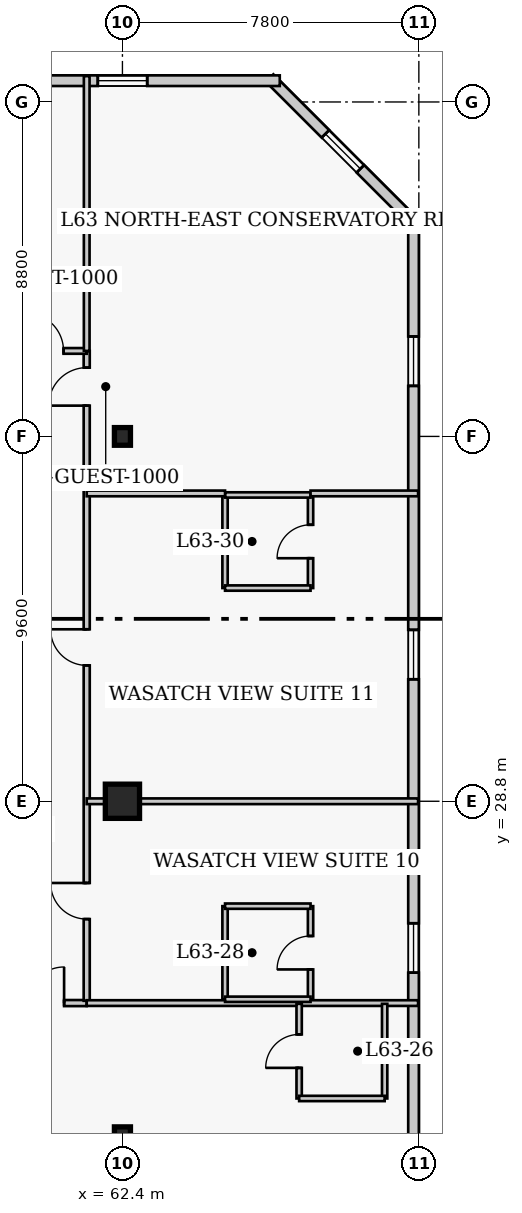
"""IFC4 building model, lengths in metres.
Left out: names, types, materials, properties, quantities, classifications, styles, units other than length and angle.
Written with IfcOpenShell. Run it as: python <this file> out.ifc"""

import sys

from ifc_helpers import new_model, si_unit, direction, frame, frame_2d, origin, origin_2d, place, context, subcontext, project, spatial, rectangle, i_section, extrude, element, fill, save


model = new_model("IFC4")
c1 = context("Model", 3, precision=1e-05, world=origin(), true_north=direction((0.0, 1.0)))
c2 = subcontext(c1, "Body", "Model", "MODEL_VIEW")
j1 = project(units=[si_unit("LENGTHUNIT", "METRE"), si_unit("PLANEANGLEUNIT", "RADIAN")], contexts=[c1])
p1 = place(None, origin())
s1 = spatial("IfcSite", under=j1, at=p1, CompositionType="ELEMENT")
p2 = place(p1, origin())
s2 = spatial("IfcBuilding", under=s1, at=p2, CompositionType="ELEMENT")
p3 = place(p2, frame((0.0, 0.0, 253.4)))
s3 = spatial("IfcBuildingStorey", under=s2, at=p3, CompositionType="ELEMENT", Elevation=253.4)
p4 = place(p3, frame((62.4, 20.0, 0.0), z_axis=(0.0, 0.0, 1.0), x_axis=(1.0, 0.0, 0.0)))
e1 = element("IfcColumn", 1, at=p4, inside=s3, PredefinedType="COLUMN", context=c2, shape_type="SweptSolid", body=[
    extrude(i_section(OverallWidth=0.422, OverallDepth=0.465, WebThickness=0.045, FlangeThickness=0.073, FilletRadius=0.017, at=origin_2d()), origin(), (0.0, 0.0, 1.0), 4.0),
])
p5 = place(p3, frame((62.4, 28.8, 0.0), z_axis=(0.0, 0.0, 1.0), x_axis=(1.0, 0.0, 0.0)))
e2 = element("IfcColumn", 2, at=p5, inside=s3, PredefinedType="COLUMN", context=c2, shape_type="SweptSolid", body=[
    extrude(rectangle(XDim=0.9, YDim=0.9, at=origin_2d()), origin(), (0.0, 0.0, 1.0), 4.0),
])
p6 = place(p3, frame((62.4, 38.4, 0.0), z_axis=(0.0, 0.0, 1.0), x_axis=(1.0, 0.0, 0.0)))
e3 = element("IfcColumn", 3, at=p6, inside=s3, PredefinedType="COLUMN", context=c2, shape_type="SweptSolid", body=[
    extrude(i_section(OverallWidth=0.422, OverallDepth=0.465, WebThickness=0.045, FlangeThickness=0.073, FilletRadius=0.017, at=origin_2d()), origin(), (0.0, 0.0, 1.0), 4.0),
])
p7 = place(p3, frame((70.06, 13.36, 0.0), z_axis=(0.0, 0.0, 1.0), x_axis=(0.0, 1.0, 0.0)))
e4 = element("IfcWall", 4, at=p7, inside=s3, PredefinedType="SOLIDWALL", context=c2, shape_type="SweptSolid", body=[
    extrude(rectangle(XDim=30.88, YDim=0.28, at=frame_2d((15.44, 0.0))), origin(), (0.0, 0.0, 1.0), 3.76),
])
p8 = place(p7, frame((3.21, 0.0, 0.85)))
e5 = element("IfcOpeningElement", 5, at=p8, cuts=e4, PredefinedType="OPENING", context=c2, shape_type="SweptSolid", body=[
    extrude(rectangle(XDim=1.3, YDim=1.7, at=frame_2d((0.65, 0.85))), frame((0.0, 0.15, 0.0), z_axis=(0.0, -1.0, 0.0), x_axis=(1.0, 0.0, 0.0)), (0.0, 0.0, 1.0), 0.3),
])
p9 = place(p7, frame((10.93, 0.0, 0.85)))
e6 = element("IfcOpeningElement", 6, at=p9, cuts=e4, PredefinedType="OPENING", context=c2, shape_type="SweptSolid", body=[
    extrude(rectangle(XDim=1.3, YDim=1.7, at=frame_2d((0.65, 0.85))), frame((0.0, 0.15, 0.0), z_axis=(0.0, -1.0, 0.0), x_axis=(1.0, 0.0, 0.0)), (0.0, 0.0, 1.0), 0.3),
])
p10 = place(p7, frame((18.65, 0.0, 0.85)))
e7 = element("IfcOpeningElement", 7, at=p10, cuts=e4, PredefinedType="OPENING", context=c2, shape_type="SweptSolid", body=[
    extrude(rectangle(XDim=1.3, YDim=1.7, at=frame_2d((0.65, 0.85))), frame((0.0, 0.15, 0.0), z_axis=(0.0, -1.0, 0.0), x_axis=(1.0, 0.0, 0.0)), (0.0, 0.0, 1.0), 0.3),
])
p11 = place(p7, frame((26.37, 0.0, 0.85)))
e8 = element("IfcOpeningElement", 8, at=p11, cuts=e4, PredefinedType="OPENING", context=c2, shape_type="SweptSolid", body=[
    extrude(rectangle(XDim=1.3, YDim=1.7, at=frame_2d((0.65, 0.85))), frame((0.0, 0.15, 0.0), z_axis=(0.0, -1.0, 0.0), x_axis=(1.0, 0.0, 0.0)), (0.0, 0.0, 1.0), 0.3),
])
p12 = place(p3, frame((70.129, 43.973, 0.0), z_axis=(0.0, 0.0, 1.0), x_axis=(-0.707106781187, 0.707106781187, 0.0)))
e9 = element("IfcWall", 9, at=p12, inside=s3, PredefinedType="SOLIDWALL", context=c2, shape_type="SweptSolid", body=[
    extrude(rectangle(XDim=5.454, YDim=0.28, at=frame_2d((2.727, 0.0))), origin(), (0.0, 0.0, 1.0), 3.76),
])
p13 = place(p12, frame((2.077, 0.0, 0.85)))
e10 = element("IfcOpeningElement", 10, at=p13, cuts=e9, PredefinedType="OPENING", context=c2, shape_type="SweptSolid", body=[
    extrude(rectangle(XDim=1.3, YDim=1.7, at=frame_2d((0.65, 0.85))), frame((0.0, 0.15, 0.0), z_axis=(0.0, -1.0, 0.0), x_axis=(1.0, 0.0, 0.0)), (0.0, 0.0, 1.0), 0.3),
])
p14 = place(p3, frame((66.54, 47.76, 0.0), z_axis=(0.0, 0.0, 1.0), x_axis=(-1.0, 0.0, 0.0)))
e11 = element("IfcWall", 11, at=p14, inside=s3, PredefinedType="SOLIDWALL", context=c2, shape_type="SweptSolid", body=[
    extrude(rectangle(XDim=24.83, YDim=0.28, at=frame_2d((12.415, 0.0))), origin(), (0.0, 0.0, 1.0), 3.76),
])
p15 = place(p14, frame((3.488, 0.0, 0.85)))
e12 = element("IfcOpeningElement", 12, at=p15, cuts=e11, PredefinedType="OPENING", context=c2, shape_type="SweptSolid", body=[
    extrude(rectangle(XDim=1.3, YDim=1.7, at=frame_2d((0.65, 0.85))), frame((0.0, 0.15, 0.0), z_axis=(0.0, -1.0, 0.0), x_axis=(1.0, 0.0, 0.0)), (0.0, 0.0, 1.0), 0.3),
])
p16 = place(p14, frame((12.915, 0.0, 0.85)))
e13 = element("IfcOpeningElement", 13, at=p16, cuts=e11, PredefinedType="OPENING", context=c2, shape_type="SweptSolid", body=[
    extrude(rectangle(XDim=1.3, YDim=1.7, at=frame_2d((0.65, 0.85))), frame((0.0, 0.15, 0.0), z_axis=(0.0, -1.0, 0.0), x_axis=(1.0, 0.0, 0.0)), (0.0, 0.0, 1.0), 0.3),
])
p17 = place(p14, frame((20.692, 0.0, 0.85)))
e14 = element("IfcOpeningElement", 14, at=p17, cuts=e11, PredefinedType="OPENING", context=c2, shape_type="SweptSolid", body=[
    extrude(rectangle(XDim=1.3, YDim=1.7, at=frame_2d((0.65, 0.85))), frame((0.0, 0.15, 0.0), z_axis=(0.0, -1.0, 0.0), x_axis=(1.0, 0.0, 0.0)), (0.0, 0.0, 1.0), 0.3),
])
p18 = place(p3, frame((35.8, 23.49, 0.0), z_axis=(0.0, 0.0, 1.0), x_axis=(1.0, 0.0, 0.0)))
e15 = element("IfcWall", 15, at=p18, inside=s3, PredefinedType="PARTITIONING", context=c2, shape_type="SweptSolid", body=[
    extrude(rectangle(XDim=25.66, YDim=0.16, at=frame_2d((12.83, 0.0))), origin(), (0.0, 0.0, 1.0), 3.76),
])
p19 = place(p18, frame((1.555, 0.0, 0.0)))
e16 = element("IfcOpeningElement", 16, at=p19, cuts=e15, PredefinedType="OPENING", context=c2, shape_type="SweptSolid", body=[
    extrude(rectangle(XDim=0.95, YDim=2.1, at=frame_2d((0.475, 1.05))), frame((0.0, 0.09, 0.0), z_axis=(0.0, -1.0, 0.0), x_axis=(1.0, 0.0, 0.0)), (0.0, 0.0, 1.0), 0.18),
])
p20 = place(p18, frame((10.57, 0.0, 0.0)))
e17 = element("IfcOpeningElement", 17, at=p20, cuts=e15, PredefinedType="OPENING", context=c2, shape_type="SweptSolid", body=[
    extrude(rectangle(XDim=0.95, YDim=2.1, at=frame_2d((0.475, 1.05))), frame((0.0, 0.09, 0.0), z_axis=(0.0, -1.0, 0.0), x_axis=(1.0, 0.0, 0.0)), (0.0, 0.0, 1.0), 0.18),
])
p21 = place(p18, frame((15.105, 0.0, 0.0)))
e18 = element("IfcOpeningElement", 18, at=p21, cuts=e15, PredefinedType="OPENING", context=c2, shape_type="SweptSolid", body=[
    extrude(rectangle(XDim=1.0, YDim=2.15, at=frame_2d((0.5, 1.075))), frame((0.0, 0.09, 0.0), z_axis=(0.0, -1.0, 0.0), x_axis=(1.0, 0.0, 0.0)), (0.0, 0.0, 1.0), 0.18),
])
p22 = place(p18, frame((19.285, 0.0, 0.0)))
e19 = element("IfcOpeningElement", 19, at=p22, cuts=e15, PredefinedType="OPENING", context=c2, shape_type="SweptSolid", body=[
    extrude(rectangle(XDim=0.95, YDim=2.1, at=frame_2d((0.475, 1.05))), frame((0.0, 0.09, 0.0), z_axis=(0.0, -1.0, 0.0), x_axis=(1.0, 0.0, 0.0)), (0.0, 0.0, 1.0), 0.18),
])
p23 = place(p18, frame((24.115, 0.0, 0.0)))
e20 = element("IfcOpeningElement", 20, at=p23, cuts=e15, PredefinedType="OPENING", context=c2, shape_type="SweptSolid", body=[
    extrude(rectangle(XDim=0.95, YDim=2.1, at=frame_2d((0.475, 1.05))), frame((0.0, 0.09, 0.0), z_axis=(0.0, -1.0, 0.0), x_axis=(1.0, 0.0, 0.0)), (0.0, 0.0, 1.0), 0.18),
])
p24 = place(p3, frame((61.46, 23.55, 0.0), z_axis=(0.0, 0.0, 1.0), x_axis=(0.0, 1.0, 0.0)))
e21 = element("IfcWall", 21, at=p24, inside=s3, PredefinedType="PARTITIONING", context=c2, shape_type="SweptSolid", body=[
    extrude(rectangle(XDim=17.1, YDim=0.16, at=frame_2d((8.55, 0.0))), origin(), (0.0, 0.0, 1.0), 3.76),
])
p25 = place(p24, frame((2.15, 0.0, 0.0)))
e22 = element("IfcOpeningElement", 22, at=p25, cuts=e21, PredefinedType="OPENING", context=c2, shape_type="SweptSolid", body=[
    extrude(rectangle(XDim=0.95, YDim=2.1, at=frame_2d((0.475, 1.05))), frame((0.0, 0.09, 0.0), z_axis=(0.0, -1.0, 0.0), x_axis=(1.0, 0.0, 0.0)), (0.0, 0.0, 1.0), 0.18),
])
p26 = place(p24, frame((8.825, 0.0, 0.0)))
e23 = element("IfcOpeningElement", 23, at=p26, cuts=e21, PredefinedType="OPENING", context=c2, shape_type="SweptSolid", body=[
    extrude(rectangle(XDim=0.95, YDim=2.1, at=frame_2d((0.475, 1.05))), frame((0.0, 0.09, 0.0), z_axis=(0.0, -1.0, 0.0), x_axis=(1.0, 0.0, 0.0)), (0.0, 0.0, 1.0), 0.18),
])
p27 = place(p24, frame((15.66, 0.0, 0.0)))
e24 = element("IfcOpeningElement", 24, at=p27, cuts=e21, PredefinedType="OPENING", context=c2, shape_type="SweptSolid", body=[
    extrude(rectangle(XDim=1.0, YDim=2.15, at=frame_2d((0.5, 1.075))), frame((0.0, 0.09, 0.0), z_axis=(0.0, -1.0, 0.0), x_axis=(1.0, 0.0, 0.0)), (0.0, 0.0, 1.0), 0.18),
])
p28 = place(p3, frame((56.8, 40.65, 0.0), z_axis=(0.0, 0.0, 1.0), x_axis=(1.0, 0.0, 0.0)))
e25 = element("IfcWall", 25, at=p28, inside=s3, PredefinedType="PARTITIONING", context=c2, shape_type="SweptSolid", body=[
    extrude(rectangle(XDim=4.66, YDim=0.15, at=frame_2d((2.33, 0.0))), origin(), (0.0, 0.0, 1.0), 3.76),
])
p29 = place(p28, frame((3.05, 0.0, 0.0)))
e26 = element("IfcOpeningElement", 26, at=p29, cuts=e25, PredefinedType="OPENING", context=c2, shape_type="SweptSolid", body=[
    extrude(rectangle(XDim=1.0, YDim=2.15, at=frame_2d((0.5, 1.075))), frame((0.0, 0.085, 0.0), z_axis=(0.0, -1.0, 0.0), x_axis=(1.0, 0.0, 0.0)), (0.0, 0.0, 1.0), 0.17),
])
p30 = place(p3, frame((61.46, 40.65, 0.0), z_axis=(0.0, 0.0, 1.0), x_axis=(0.0, 1.0, 0.0)))
e27 = element("IfcWall", 27, at=p30, inside=s3, PredefinedType="PARTITIONING", context=c2, shape_type="SweptSolid", body=[
    extrude(rectangle(XDim=7.23, YDim=0.15, at=frame_2d((3.615, 0.0))), origin(), (0.0, 0.0, 1.0), 3.76),
])
p31 = place(p3, frame((61.46, 23.49, 0.0), z_axis=(0.0, 0.0, 1.0), x_axis=(1.0, 0.0, 0.0)))
e28 = element("IfcWall", 28, at=p31, inside=s3, PredefinedType="PARTITIONING", context=c2, shape_type="SweptSolid", body=[
    extrude(rectangle(XDim=8.72, YDim=0.15, at=frame_2d((4.36, 0.0))), origin(), (0.0, 0.0, 1.0), 3.76),
])
p32 = place(p3, frame((67.05, 20.98, 0.0), z_axis=(0.0, 0.0, 1.0), x_axis=(0.0, 1.0, 0.0)))
e29 = element("IfcWall", 29, at=p32, inside=s3, PredefinedType="PLUMBINGWALL", context=c2, shape_type="SweptSolid", body=[
    extrude(rectangle(XDim=2.49, YDim=0.14, at=frame_2d((1.245, 0.0))), origin(), (0.0, 0.0, 1.0), 3.76),
])
p33 = place(p32, frame((0.805, 0.0, 0.0)))
e30 = element("IfcOpeningElement", 30, at=p33, cuts=e29, PredefinedType="OPENING", context=c2, shape_type="SweptSolid", body=[
    extrude(rectangle(XDim=0.88, YDim=2.05, at=frame_2d((0.44, 1.025))), frame((0.0, 0.08, 0.0), z_axis=(0.0, -1.0, 0.0), x_axis=(1.0, 0.0, 0.0)), (0.0, 0.0, 1.0), 0.16),
])
p34 = place(p3, frame((69.3, 20.98, 0.0), z_axis=(0.0, 0.0, 1.0), x_axis=(0.0, 1.0, 0.0)))
e31 = element("IfcWall", 31, at=p34, inside=s3, PredefinedType="PLUMBINGWALL", context=c2, shape_type="SweptSolid", body=[
    extrude(rectangle(XDim=2.49, YDim=0.14, at=frame_2d((1.245, 0.0))), origin(), (0.0, 0.0, 1.0), 3.76),
])
p35 = place(p3, frame((67.05, 20.98, 0.0), z_axis=(0.0, 0.0, 1.0), x_axis=(1.0, 0.0, 0.0)))
e32 = element("IfcWall", 32, at=p35, inside=s3, PredefinedType="PLUMBINGWALL", context=c2, shape_type="SweptSolid", body=[
    extrude(rectangle(XDim=2.25, YDim=0.14, at=frame_2d((1.125, 0.0))), origin(), (0.0, 0.0, 1.0), 3.76),
])
p36 = place(p3, frame((65.1, 23.59, 0.0), z_axis=(0.0, 0.0, 1.0), x_axis=(0.0, 1.0, 0.0)))
e33 = element("IfcWall", 33, at=p36, inside=s3, PredefinedType="PLUMBINGWALL", context=c2, shape_type="SweptSolid", body=[
    extrude(rectangle(XDim=2.45, YDim=0.14, at=frame_2d((1.225, 0.0))), origin(), (0.0, 0.0, 1.0), 3.76),
])
p37 = place(p3, frame((67.35, 23.59, 0.0), z_axis=(0.0, 0.0, 1.0), x_axis=(0.0, 1.0, 0.0)))
e34 = element("IfcWall", 34, at=p37, inside=s3, PredefinedType="PLUMBINGWALL", context=c2, shape_type="SweptSolid", body=[
    extrude(rectangle(XDim=2.45, YDim=0.14, at=frame_2d((1.225, 0.0))), origin(), (0.0, 0.0, 1.0), 3.76),
])
p38 = place(p37, frame((0.785, 0.0, 0.0)))
e35 = element("IfcOpeningElement", 35, at=p38, cuts=e34, PredefinedType="OPENING", context=c2, shape_type="SweptSolid", body=[
    extrude(rectangle(XDim=0.88, YDim=2.05, at=frame_2d((0.44, 1.025))), frame((0.0, 0.08, 0.0), z_axis=(0.0, -1.0, 0.0), x_axis=(1.0, 0.0, 0.0)), (0.0, 0.0, 1.0), 0.16),
])
for number, where, z_axis, x_axis in (
    (36, (65.1, 23.59, 0.0), (0.0, 0.0, 1.0), (1.0, 0.0, 0.0)),
    (37, (65.1, 26.04, 0.0), (0.0, 0.0, 1.0), (1.0, 0.0, 0.0)),
):
    element("IfcWall", number, at=place(p3, frame(where, z_axis=z_axis, x_axis=x_axis)), inside=s3, PredefinedType="PLUMBINGWALL", context=c2, shape_type="SweptSolid", body=[
        extrude(rectangle(XDim=2.25, YDim=0.14, at=frame_2d((1.125, 0.0))), origin(), (0.0, 0.0, 1.0), 3.76),
    ])
p39 = place(p3, frame((61.46, 28.8, 0.0), z_axis=(0.0, 0.0, 1.0), x_axis=(1.0, 0.0, 0.0)))
e38 = element("IfcWall", 38, at=p39, inside=s3, PredefinedType="PARTITIONING", context=c2, shape_type="SweptSolid", body=[
    extrude(rectangle(XDim=8.72, YDim=0.15, at=frame_2d((4.36, 0.0))), origin(), (0.0, 0.0, 1.0), 3.064),
])
p40 = place(p3, frame((65.1, 34.41, 0.0), z_axis=(0.0, 0.0, 1.0), x_axis=(0.0, 1.0, 0.0)))
e39 = element("IfcWall", 39, at=p40, inside=s3, PredefinedType="PLUMBINGWALL", context=c2, shape_type="SweptSolid", body=[
    extrude(rectangle(XDim=2.45, YDim=0.14, at=frame_2d((1.225, 0.0))), origin(), (0.0, 0.0, 1.0), 3.76),
])
p41 = place(p3, frame((67.35, 34.41, 0.0), z_axis=(0.0, 0.0, 1.0), x_axis=(0.0, 1.0, 0.0)))
e40 = element("IfcWall", 40, at=p41, inside=s3, PredefinedType="PLUMBINGWALL", context=c2, shape_type="SweptSolid", body=[
    extrude(rectangle(XDim=2.45, YDim=0.14, at=frame_2d((1.225, 0.0))), origin(), (0.0, 0.0, 1.0), 3.76),
])
p42 = place(p41, frame((0.785, 0.0, 0.0)))
e41 = element("IfcOpeningElement", 41, at=p42, cuts=e40, PredefinedType="OPENING", context=c2, shape_type="SweptSolid", body=[
    extrude(rectangle(XDim=0.88, YDim=2.05, at=frame_2d((0.44, 1.025))), frame((0.0, 0.08, 0.0), z_axis=(0.0, -1.0, 0.0), x_axis=(1.0, 0.0, 0.0)), (0.0, 0.0, 1.0), 0.16),
])
for number, where, z_axis, x_axis in (
    (42, (65.1, 34.41, 0.0), (0.0, 0.0, 1.0), (1.0, 0.0, 0.0)),
    (43, (65.1, 36.86, 0.0), (0.0, 0.0, 1.0), (1.0, 0.0, 0.0)),
):
    element("IfcWall", number, at=place(p3, frame(where, z_axis=z_axis, x_axis=x_axis)), inside=s3, PredefinedType="PLUMBINGWALL", context=c2, shape_type="SweptSolid", body=[
        extrude(rectangle(XDim=2.25, YDim=0.14, at=frame_2d((1.125, 0.0))), origin(), (0.0, 0.0, 1.0), 3.76),
    ])
p43 = place(p3, frame((61.46, 36.9, 0.0), z_axis=(0.0, 0.0, 1.0), x_axis=(1.0, 0.0, 0.0)))
e44 = element("IfcWall", 44, at=p43, inside=s3, PredefinedType="PARTITIONING", context=c2, shape_type="SweptSolid", body=[
    extrude(rectangle(XDim=3.64, YDim=0.15, at=frame_2d((1.82, 0.0))), origin(), (0.0, 0.0, 1.0), 3.76),
])
p44 = place(p3, frame((67.35, 36.9, 0.0), z_axis=(0.0, 0.0, 1.0), x_axis=(1.0, 0.0, 0.0)))
e45 = element("IfcWall", 45, at=p44, inside=s3, PredefinedType="PARTITIONING", context=c2, shape_type="SweptSolid", body=[
    extrude(rectangle(XDim=2.83, YDim=0.15, at=frame_2d((1.415, 0.0))), origin(), (0.0, 0.0, 1.0), 3.76),
])
p45 = place(p9, origin())
e46 = element("IfcWindow", 46, at=p45, inside=s3, PartitioningType="SINGLE_PANEL", PredefinedType="WINDOW", context=c2, shape_type="SweptSolid", body=[
    extrude(rectangle(XDim=1.3, YDim=1.7, at=frame_2d((0.65, 0.85))), frame((0.0, 0.03, 0.0), z_axis=(0.0, -1.0, 0.0), x_axis=(1.0, 0.0, 0.0)), (0.0, 0.0, 1.0), 0.06),
])
fill(e6, e46)
p46 = place(p10, origin())
e47 = element("IfcWindow", 47, at=p46, inside=s3, PartitioningType="SINGLE_PANEL", PredefinedType="WINDOW", context=c2, shape_type="SweptSolid", body=[
    extrude(rectangle(XDim=1.3, YDim=1.7, at=frame_2d((0.65, 0.85))), frame((0.0, 0.03, 0.0), z_axis=(0.0, -1.0, 0.0), x_axis=(1.0, 0.0, 0.0)), (0.0, 0.0, 1.0), 0.06),
])
fill(e7, e47)
p47 = place(p11, origin())
e48 = element("IfcWindow", 48, at=p47, inside=s3, PartitioningType="SINGLE_PANEL", PredefinedType="WINDOW", context=c2, shape_type="SweptSolid", body=[
    extrude(rectangle(XDim=1.3, YDim=1.7, at=frame_2d((0.65, 0.85))), frame((0.0, 0.03, 0.0), z_axis=(0.0, -1.0, 0.0), x_axis=(1.0, 0.0, 0.0)), (0.0, 0.0, 1.0), 0.06),
])
fill(e8, e48)
p48 = place(p13, origin())
e49 = element("IfcWindow", 49, at=p48, inside=s3, PartitioningType="SINGLE_PANEL", PredefinedType="WINDOW", context=c2, shape_type="SweptSolid", body=[
    extrude(rectangle(XDim=1.3, YDim=1.7, at=frame_2d((0.65, 0.85))), frame((0.0, 0.03, 0.0), z_axis=(0.0, -1.0, 0.0), x_axis=(1.0, 0.0, 0.0)), (0.0, 0.0, 1.0), 0.06),
])
fill(e10, e49)
p49 = place(p15, origin())
e50 = element("IfcWindow", 50, at=p49, inside=s3, PartitioningType="SINGLE_PANEL", PredefinedType="WINDOW", context=c2, shape_type="SweptSolid", body=[
    extrude(rectangle(XDim=1.3, YDim=1.7, at=frame_2d((0.65, 0.85))), frame((0.0, 0.03, 0.0), z_axis=(0.0, -1.0, 0.0), x_axis=(1.0, 0.0, 0.0)), (0.0, 0.0, 1.0), 0.06),
])
fill(e12, e50)
p50 = place(p29, origin())
e51 = element("IfcDoor", 51, at=p50, inside=s3, OperationType="SINGLE_SWING_LEFT", PredefinedType="DOOR", context=c2, shape_type="SweptSolid", body=[
    extrude(rectangle(XDim=1.0, YDim=2.15, at=frame_2d((0.5, 1.075))), frame((0.0, 0.025, 0.0), z_axis=(0.0, -1.0, 0.0), x_axis=(1.0, 0.0, 0.0)), (0.0, 0.0, 1.0), 0.05),
])
fill(e26, e51)
p51 = place(p33, origin())
e52 = element("IfcDoor", 52, at=p51, inside=s3, OperationType="SINGLE_SWING_LEFT", PredefinedType="DOOR", context=c2, shape_type="SweptSolid", body=[
    extrude(rectangle(XDim=0.88, YDim=2.05, at=frame_2d((0.44, 1.025))), frame((0.0, 0.025, 0.0), z_axis=(0.0, -1.0, 0.0), x_axis=(1.0, 0.0, 0.0)), (0.0, 0.0, 1.0), 0.05),
])
fill(e30, e52)
p52 = place(p23, origin())
e53 = element("IfcDoor", 53, at=p52, inside=s3, OperationType="SINGLE_SWING_RIGHT", PredefinedType="DOOR", context=c2, shape_type="SweptSolid", body=[
    extrude(rectangle(XDim=0.95, YDim=2.1, at=frame_2d((0.475, 1.05))), frame((0.0, 0.025, 0.0), z_axis=(0.0, -1.0, 0.0), x_axis=(1.0, 0.0, 0.0)), (0.0, 0.0, 1.0), 0.05),
])
fill(e20, e53)
p53 = place(p38, origin())
e54 = element("IfcDoor", 54, at=p53, inside=s3, OperationType="SINGLE_SWING_LEFT", PredefinedType="DOOR", context=c2, shape_type="SweptSolid", body=[
    extrude(rectangle(XDim=0.88, YDim=2.05, at=frame_2d((0.44, 1.025))), frame((0.0, 0.025, 0.0), z_axis=(0.0, -1.0, 0.0), x_axis=(1.0, 0.0, 0.0)), (0.0, 0.0, 1.0), 0.05),
])
fill(e35, e54)
p54 = place(p25, origin())
e55 = element("IfcDoor", 55, at=p54, inside=s3, OperationType="SINGLE_SWING_RIGHT", PredefinedType="DOOR", context=c2, shape_type="SweptSolid", body=[
    extrude(rectangle(XDim=0.95, YDim=2.1, at=frame_2d((0.475, 1.05))), frame((0.0, 0.025, 0.0), z_axis=(0.0, -1.0, 0.0), x_axis=(1.0, 0.0, 0.0)), (0.0, 0.0, 1.0), 0.05),
])
fill(e22, e55)
p55 = place(p42, origin())
e56 = element("IfcDoor", 56, at=p55, inside=s3, OperationType="SINGLE_SWING_LEFT", PredefinedType="DOOR", context=c2, shape_type="SweptSolid", body=[
    extrude(rectangle(XDim=0.88, YDim=2.05, at=frame_2d((0.44, 1.025))), frame((0.0, 0.025, 0.0), z_axis=(0.0, -1.0, 0.0), x_axis=(1.0, 0.0, 0.0)), (0.0, 0.0, 1.0), 0.05),
])
fill(e41, e56)
p56 = place(p26, origin())
e57 = element("IfcDoor", 57, at=p56, inside=s3, OperationType="SINGLE_SWING_RIGHT", PredefinedType="DOOR", context=c2, shape_type="SweptSolid", body=[
    extrude(rectangle(XDim=0.95, YDim=2.1, at=frame_2d((0.475, 1.05))), frame((0.0, 0.025, 0.0), z_axis=(0.0, -1.0, 0.0), x_axis=(1.0, 0.0, 0.0)), (0.0, 0.0, 1.0), 0.05),
])
fill(e23, e57)
p57 = place(p27, origin())
e58 = element("IfcDoor", 58, at=p57, inside=s3, OperationType="SINGLE_SWING_LEFT", PredefinedType="DOOR", context=c2, shape_type="SweptSolid", body=[
    extrude(rectangle(XDim=1.0, YDim=2.15, at=frame_2d((0.5, 1.075))), frame((0.0, 0.025, 0.0), z_axis=(0.0, -1.0, 0.0), x_axis=(1.0, 0.0, 0.0)), (0.0, 0.0, 1.0), 0.05),
])
fill(e24, e58)
save(model, sys.argv[1])
